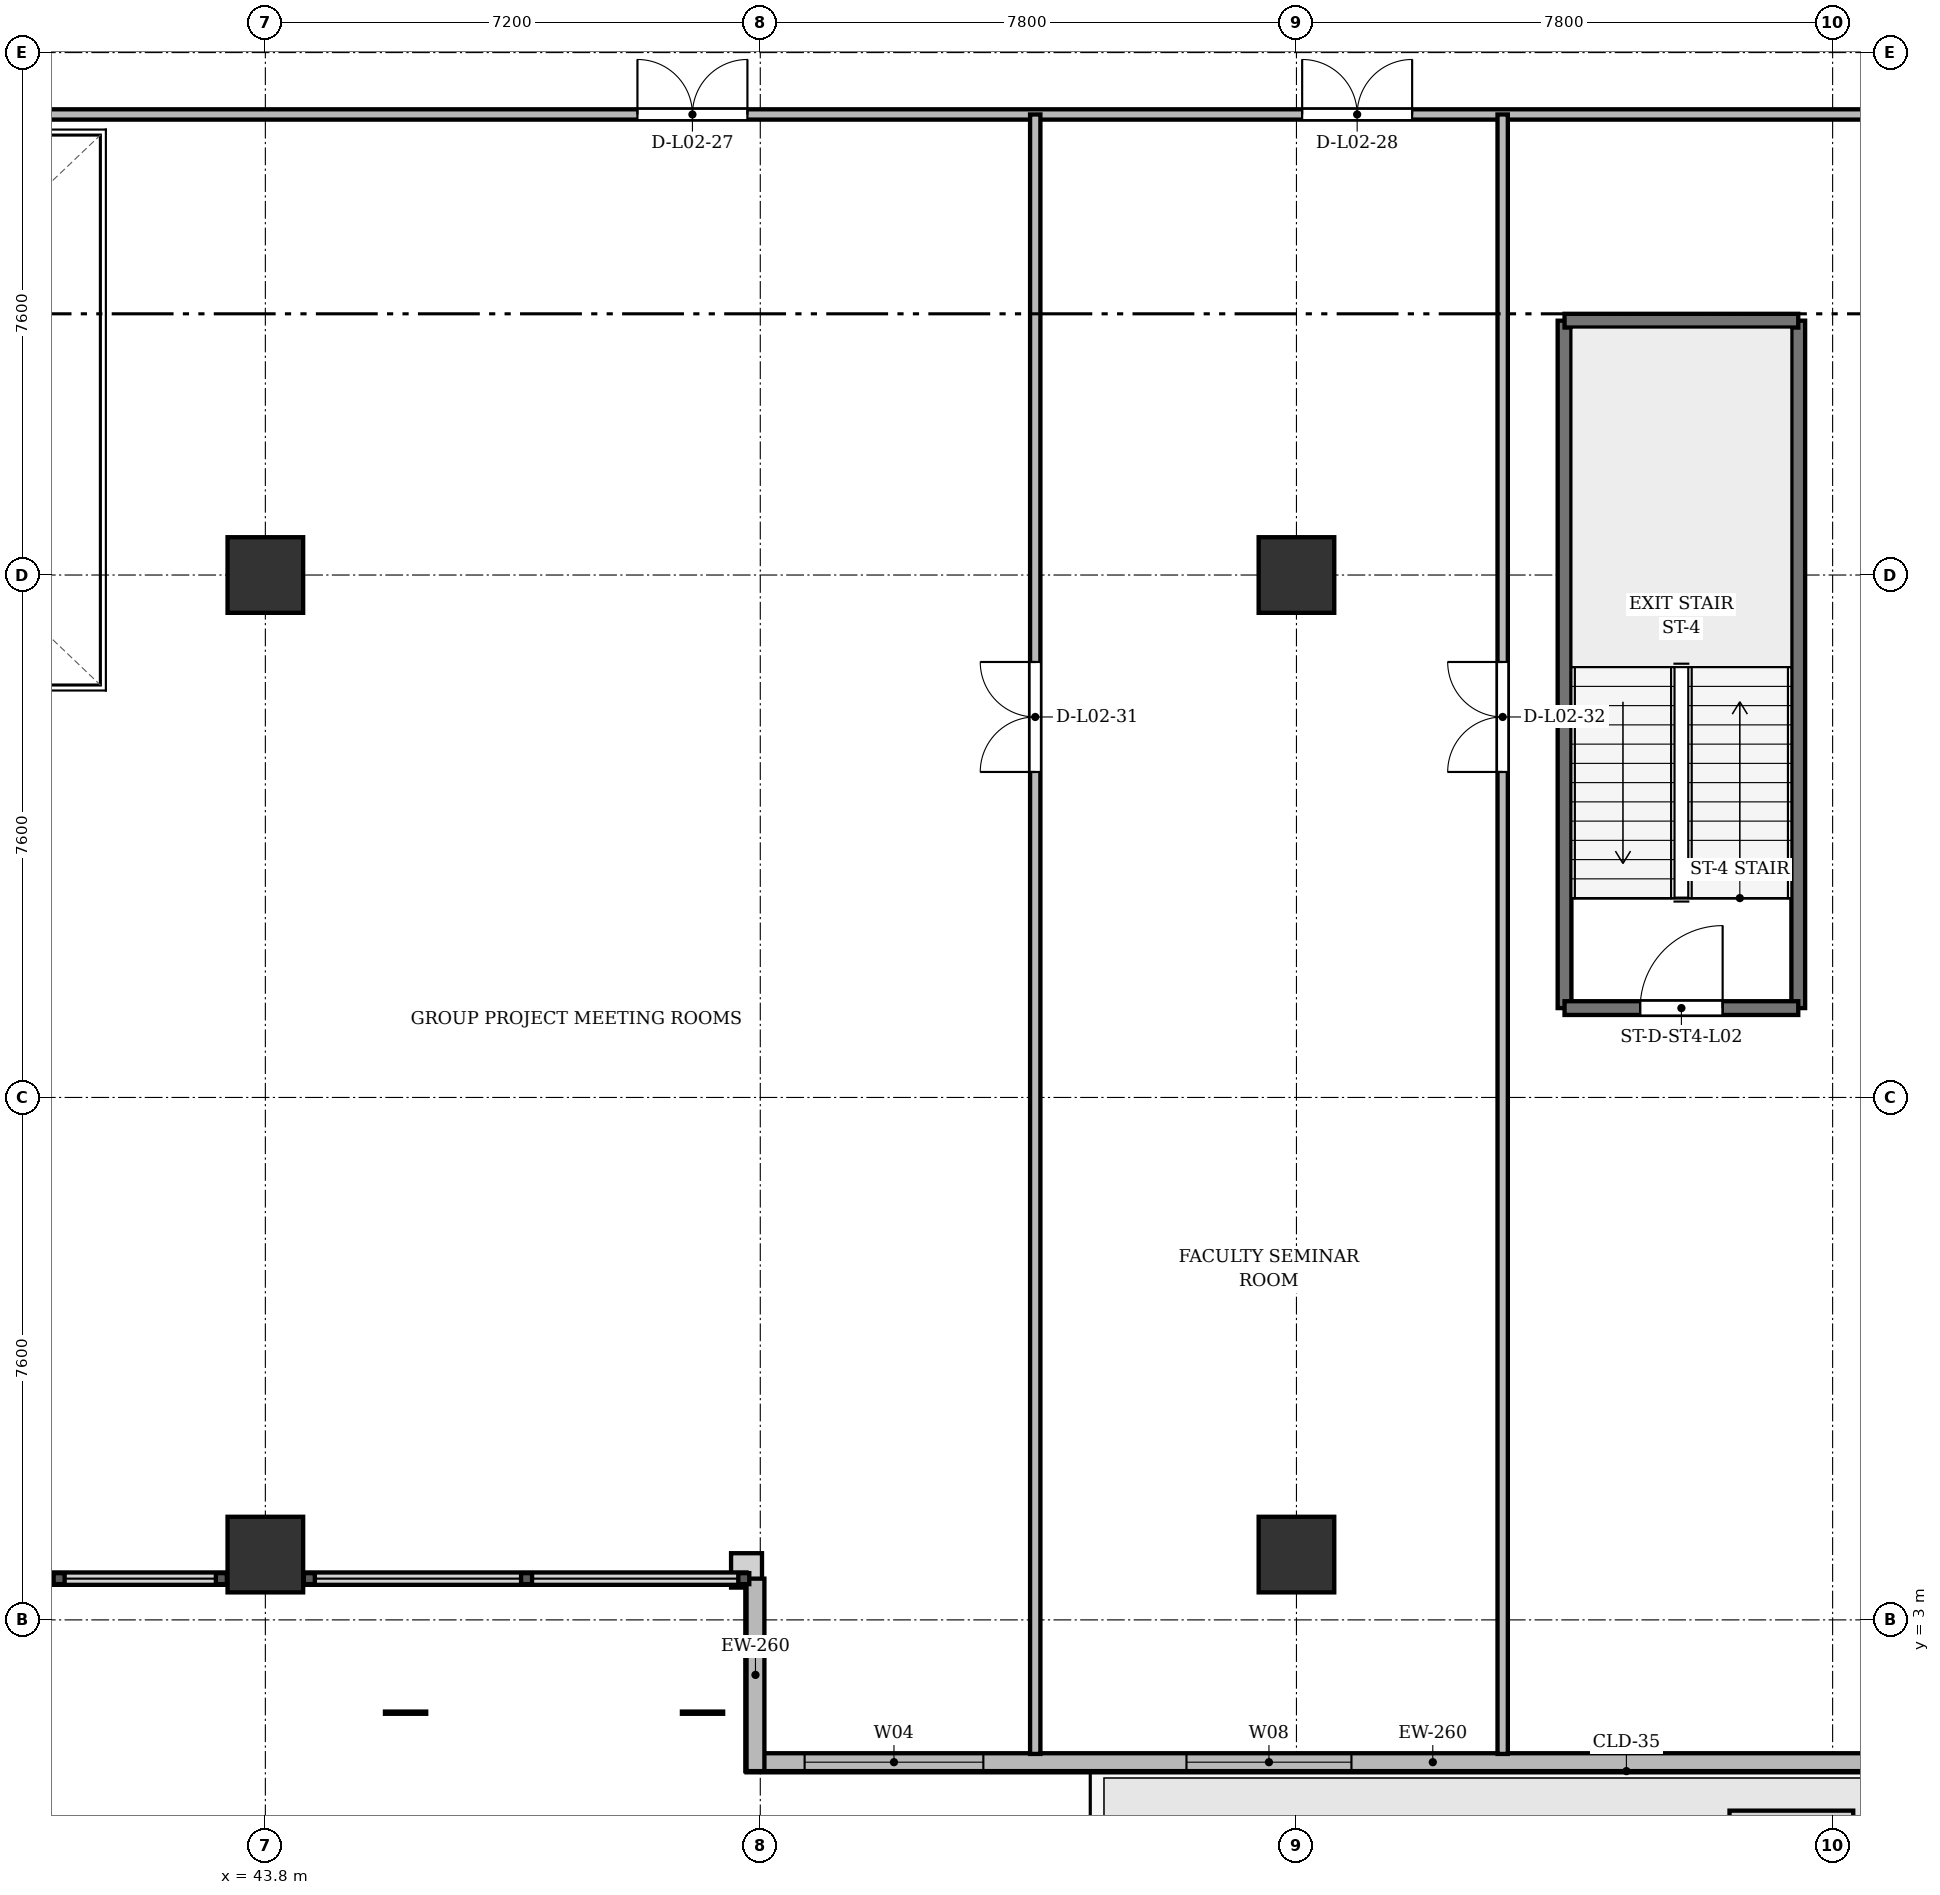
"""IFC4 building model, lengths in metres.
Left out: names, types, materials, properties, quantities, classifications, styles, units other than length and angle.
Written with IfcOpenShell. Run it as: python <this file> out.ifc"""

import sys

from ifc_helpers import new_model, si_unit, direction, frame, frame_2d, origin, origin_2d, place, context, subcontext, project, spatial, rectangle, extrude, source, transform, mapped, element, fill, save


model = new_model("IFC4")
c1 = context("Model", 3, precision=1e-05, world=origin(), true_north=direction((0.0, 1.0)))
c2 = subcontext(c1, "Body", "Model", "MODEL_VIEW")
j1 = project(units=[si_unit("LENGTHUNIT", "METRE"), si_unit("PLANEANGLEUNIT", "RADIAN")], contexts=[c1])
p1 = place(None, origin())
s1 = spatial("IfcSite", under=j1, at=p1, CompositionType="ELEMENT")
p2 = place(p1, origin())
s2 = spatial("IfcBuilding", under=s1, at=p2, CompositionType="ELEMENT")
p3 = place(p2, frame((0.0, 0.0, 9.7)))
s3 = spatial("IfcBuildingStorey", under=s2, at=p3, CompositionType="ELEMENT", Elevation=9.7)
m1 = source(origin(), c2, "Body", "SweptSolid", [
    extrude(rectangle(XDim=1.1, YDim=1.1, at=origin_2d()), origin(), (0.0, 0.0, 1.0), 4.5),
])
for number, where, z_axis, x_axis in (
    (1, (43.8, 3.95, 0.0), (0.0, 0.0, 1.0), (1.0, 0.0, 0.0)),
    (2, (43.8, 18.2, 0.0), (0.0, 0.0, 1.0), (1.0, 0.0, 0.0)),
    (3, (58.8, 3.95, 0.0), (0.0, 0.0, 1.0), (1.0, 0.0, 0.0)),
    (4, (58.8, 18.2, 0.0), (0.0, 0.0, 1.0), (1.0, 0.0, 0.0)),
):
    element("IfcColumn", number, at=place(p3, frame(where, z_axis=z_axis, x_axis=x_axis)), inside=s3, PredefinedType="COLUMN", context=c2, shape_type="MappedRepresentation", body=[
        mapped(m1, transform((0.0, 0.0, 0.0), x_axis=(1.0, 0.0, 0.0), y_axis=(0.0, 1.0, 0.0), z_axis=(0.0, 0.0, 1.0), scale=1.0)),
    ])
p4 = place(p3, frame((76.4, 0.93, 0.0), z_axis=(0.0, 0.0, 1.0), x_axis=(-1.0, 0.0, 0.0)))
e5 = element("IfcWall", 5, at=p4, inside=s3, PredefinedType="SOLIDWALL", context=c2, shape_type="SweptSolid", body=[
    extrude(rectangle(XDim=25.6, YDim=0.26, at=frame_2d((12.8, 0.0))), origin(), (0.0, 0.0, 1.0), 4.2),
])
p5 = place(p4, frame((3.833, 0.0, 0.0)))
e6 = element("IfcOpeningElement", 6, at=p5, cuts=e5, PredefinedType="OPENING", context=c2, shape_type="SweptSolid", body=[
    extrude(rectangle(XDim=1.5, YDim=2.25, at=frame_2d((0.75, 1.125))), frame((0.0, 0.14, 0.0), z_axis=(0.0, -1.0, 0.0), x_axis=(1.0, 0.0, 0.0)), (0.0, 0.0, 1.0), 0.28),
])
p6 = place(p4, frame((16.8, 0.0, 0.9)))
e7 = element("IfcOpeningElement", 7, at=p6, cuts=e5, PredefinedType="OPENING", context=c2, shape_type="SweptSolid", body=[
    extrude(rectangle(XDim=2.4, YDim=2.1, at=frame_2d((1.2, 1.05))), frame((0.0, 0.14, 0.0), z_axis=(0.0, -1.0, 0.0), x_axis=(1.0, 0.0, 0.0)), (0.0, 0.0, 1.0), 0.28),
])
p7 = place(p4, frame((22.155, 0.0, 0.9)))
e8 = element("IfcOpeningElement", 8, at=p7, cuts=e5, PredefinedType="OPENING", context=c2, shape_type="SweptSolid", body=[
    extrude(rectangle(XDim=2.6, YDim=1.9, at=frame_2d((1.3, 0.95))), frame((0.0, 0.14, 0.0), z_axis=(0.0, -1.0, 0.0), x_axis=(1.0, 0.0, 0.0)), (0.0, 0.0, 1.0), 0.28),
])
p8 = place(p3, frame((50.93, 0.8, 0.0), z_axis=(0.0, 0.0, 1.0), x_axis=(0.0, 1.0, 0.0)))
e9 = element("IfcWall", 9, at=p8, inside=s3, PredefinedType="SOLIDWALL", context=c2, shape_type="SweptSolid", body=[
    extrude(rectangle(XDim=2.8, YDim=0.26, at=frame_2d((1.4, 0.0))), origin(), (0.0, 0.0, 1.0), 4.2),
])
for number, where, z_axis, x_axis in (
    (10, (62.7, 11.9, 0.0), (0.0, 0.0, 1.0), (0.0, 1.0, 0.0)),
    (11, (66.1, 11.9, 0.0), (0.0, 0.0, 1.0), (0.0, 1.0, 0.0)),
):
    element("IfcWall", number, at=place(p3, frame(where, z_axis=z_axis, x_axis=x_axis)), inside=s3, PredefinedType="SHEAR", context=c2, shape_type="SweptSolid", body=[
        extrude(rectangle(XDim=10.0, YDim=0.2, at=frame_2d((5.0, 0.0))), origin(), (0.0, 0.0, 1.0), 4.2),
    ])
p9 = place(p3, frame((62.7, 11.9, 0.0), z_axis=(0.0, 0.0, 1.0), x_axis=(1.0, 0.0, 0.0)))
e12 = element("IfcWall", 12, at=p9, inside=s3, PredefinedType="SHEAR", context=c2, shape_type="SweptSolid", body=[
    extrude(rectangle(XDim=3.4, YDim=0.2, at=frame_2d((1.7, 0.0))), origin(), (0.0, 0.0, 1.0), 4.2),
])
p10 = place(p9, frame((1.1, 0.0, 0.0)))
e13 = element("IfcOpeningElement", 13, at=p10, cuts=e12, PredefinedType="OPENING", context=c2, shape_type="SweptSolid", body=[
    extrude(rectangle(XDim=1.2, YDim=2.15, at=frame_2d((0.6, 1.075))), frame((0.0, 0.11, 0.0), z_axis=(0.0, -1.0, 0.0), x_axis=(1.0, 0.0, 0.0)), (0.0, 0.0, 1.0), 0.22),
])
p11 = place(p3, frame((62.7, 21.9, 0.0), z_axis=(0.0, 0.0, 1.0), x_axis=(1.0, 0.0, 0.0)))
e14 = element("IfcWall", 14, at=p11, inside=s3, PredefinedType="SHEAR", context=c2, shape_type="SweptSolid", body=[
    extrude(rectangle(XDim=3.4, YDim=0.2, at=frame_2d((1.7, 0.0))), origin(), (0.0, 0.0, 1.0), 4.2),
])
p12 = place(p3, frame((-1.75, 24.9, 0.0), z_axis=(0.0, 0.0, 1.0), x_axis=(1.0, 0.0, 0.0)))
e15 = element("IfcWall", 15, at=p12, inside=s3, PredefinedType="PARTITIONING", context=c2, shape_type="SweptSolid", body=[
    extrude(rectangle(XDim=77.9, YDim=0.15, at=frame_2d((38.95, 0.0))), origin(), (0.0, 0.0, 1.0), 3.4),
])
p13 = place(p12, frame((2.679, 0.0, 0.0)))
e16 = element("IfcOpeningElement", 16, at=p13, cuts=e15, PredefinedType="OPENING", context=c2, shape_type="SweptSolid", body=[
    extrude(rectangle(XDim=1.6, YDim=2.2, at=frame_2d((0.8, 1.1))), frame((0.0, 0.085, 0.0), z_axis=(0.0, -1.0, 0.0), x_axis=(1.0, 0.0, 0.0)), (0.0, 0.0, 1.0), 0.17),
])
p14 = place(p12, frame((24.526, 0.0, 0.0)))
e17 = element("IfcOpeningElement", 17, at=p14, cuts=e15, PredefinedType="OPENING", context=c2, shape_type="SweptSolid", body=[
    extrude(rectangle(XDim=1.6, YDim=2.2, at=frame_2d((0.8, 1.1))), frame((0.0, 0.085, 0.0), z_axis=(0.0, -1.0, 0.0), x_axis=(1.0, 0.0, 0.0)), (0.0, 0.0, 1.0), 0.17),
])
p15 = place(p12, frame((50.963, 0.0, 0.0)))
e18 = element("IfcOpeningElement", 18, at=p15, cuts=e15, PredefinedType="OPENING", context=c2, shape_type="SweptSolid", body=[
    extrude(rectangle(XDim=1.6, YDim=2.2, at=frame_2d((0.8, 1.1))), frame((0.0, 0.085, 0.0), z_axis=(0.0, -1.0, 0.0), x_axis=(1.0, 0.0, 0.0)), (0.0, 0.0, 1.0), 0.17),
])
p16 = place(p12, frame((60.633, 0.0, 0.0)))
e19 = element("IfcOpeningElement", 19, at=p16, cuts=e15, PredefinedType="OPENING", context=c2, shape_type="SweptSolid", body=[
    extrude(rectangle(XDim=1.6, YDim=2.2, at=frame_2d((0.8, 1.1))), frame((0.0, 0.085, 0.0), z_axis=(0.0, -1.0, 0.0), x_axis=(1.0, 0.0, 0.0)), (0.0, 0.0, 1.0), 0.17),
])
p17 = place(p12, frame((74.888, 0.0, 0.0)))
e20 = element("IfcOpeningElement", 20, at=p17, cuts=e15, PredefinedType="OPENING", context=c2, shape_type="SweptSolid", body=[
    extrude(rectangle(XDim=1.6, YDim=2.2, at=frame_2d((0.8, 1.1))), frame((0.0, 0.085, 0.0), z_axis=(0.0, -1.0, 0.0), x_axis=(1.0, 0.0, 0.0)), (0.0, 0.0, 1.0), 0.17),
])
p18 = place(p3, frame((55.0, 1.05, 0.0), z_axis=(0.0, 0.0, 1.0), x_axis=(0.0, 1.0, 0.0)))
e21 = element("IfcWall", 21, at=p18, inside=s3, PredefinedType="PARTITIONING", context=c2, shape_type="SweptSolid", body=[
    extrude(rectangle(XDim=23.85, YDim=0.15, at=frame_2d((11.925, 0.0))), origin(), (0.0, 0.0, 1.0), 3.1),
])
p19 = place(p18, frame((14.285, 0.0, 0.0)))
e22 = element("IfcOpeningElement", 22, at=p19, cuts=e21, PredefinedType="OPENING", context=c2, shape_type="SweptSolid", body=[
    extrude(rectangle(XDim=1.6, YDim=2.2, at=frame_2d((0.8, 1.1))), frame((0.0, 0.085, 0.0), z_axis=(0.0, -1.0, 0.0), x_axis=(1.0, 0.0, 0.0)), (0.0, 0.0, 1.0), 0.17),
])
p20 = place(p3, frame((61.8, 1.05, 0.0), z_axis=(0.0, 0.0, 1.0), x_axis=(0.0, 1.0, 0.0)))
e23 = element("IfcWall", 23, at=p20, inside=s3, PredefinedType="PARTITIONING", context=c2, shape_type="SweptSolid", body=[
    extrude(rectangle(XDim=23.85, YDim=0.15, at=frame_2d((11.925, 0.0))), origin(), (0.0, 0.0, 1.0), 3.1),
])
p21 = place(p20, frame((14.285, 0.0, 0.0)))
e24 = element("IfcOpeningElement", 24, at=p21, cuts=e23, PredefinedType="OPENING", context=c2, shape_type="SweptSolid", body=[
    extrude(rectangle(XDim=1.6, YDim=2.2, at=frame_2d((0.8, 1.1))), frame((0.0, 0.085, 0.0), z_axis=(0.0, -1.0, 0.0), x_axis=(1.0, 0.0, 0.0)), (0.0, 0.0, 1.0), 0.17),
])
m2 = source(origin(), c2, "Body", "SweptSolid", [
    extrude(rectangle(XDim=2.4, YDim=2.1, at=frame_2d((1.2, 1.05))), frame((0.0, 0.03, 0.0), z_axis=(0.0, -1.0, 0.0), x_axis=(1.0, 0.0, 0.0)), (0.0, 0.0, 1.0), 0.06),
])
p22 = place(p6, origin())
e25 = element("IfcWindow", 25, at=p22, inside=s3, PartitioningType="SINGLE_PANEL", PredefinedType="WINDOW", context=c2, shape_type="MappedRepresentation", body=[
    mapped(m2, transform((0.0, 0.0, 0.0), x_axis=(1.0, 0.0, 0.0), y_axis=(0.0, 1.0, 0.0), z_axis=(0.0, 0.0, 1.0), scale=1.0)),
])
fill(e7, e25)
m3 = source(origin(), c2, "Body", "SweptSolid", [
    extrude(rectangle(XDim=2.6, YDim=1.9, at=frame_2d((1.3, 0.95))), frame((0.0, 0.03, 0.0), z_axis=(0.0, -1.0, 0.0), x_axis=(1.0, 0.0, 0.0)), (0.0, 0.0, 1.0), 0.06),
])
p23 = place(p7, origin())
e26 = element("IfcWindow", 26, at=p23, inside=s3, PartitioningType="SINGLE_PANEL", PredefinedType="WINDOW", context=c2, shape_type="MappedRepresentation", body=[
    mapped(m3, transform((0.0, 0.0, 0.0), x_axis=(1.0, 0.0, 0.0), y_axis=(0.0, 1.0, 0.0), z_axis=(0.0, 0.0, 1.0), scale=1.0)),
])
fill(e8, e26)
m4 = source(origin(), c2, "Body", "SweptSolid", [
    extrude(rectangle(XDim=1.2, YDim=2.15, at=frame_2d((0.6, 1.075))), frame((0.0, 0.025, 0.0), z_axis=(0.0, -1.0, 0.0), x_axis=(1.0, 0.0, 0.0)), (0.0, 0.0, 1.0), 0.05),
])
p24 = place(p10, origin())
e27 = element("IfcDoor", 27, at=p24, inside=s3, OperationType="SINGLE_SWING_RIGHT", PredefinedType="DOOR", context=c2, shape_type="MappedRepresentation", body=[
    mapped(m4, transform((0.0, 0.0, 0.0), x_axis=(1.0, 0.0, 0.0), y_axis=(0.0, 1.0, 0.0), z_axis=(0.0, 0.0, 1.0), scale=1.0)),
])
fill(e13, e27)
m5 = source(origin(), c2, "Body", "SweptSolid", [
    extrude(rectangle(XDim=1.6, YDim=2.2, at=frame_2d((0.8, 1.1))), frame((0.0, 0.025, 0.0), z_axis=(0.0, -1.0, 0.0), x_axis=(1.0, 0.0, 0.0)), (0.0, 0.0, 1.0), 0.05),
])
p25 = place(p15, origin())
e28 = element("IfcDoor", 28, at=p25, inside=s3, OperationType="DOUBLE_DOOR_SINGLE_SWING", PredefinedType="DOOR", context=c2, shape_type="MappedRepresentation", body=[
    mapped(m5, transform((0.0, 0.0, 0.0), x_axis=(1.0, 0.0, 0.0), y_axis=(0.0, 1.0, 0.0), z_axis=(0.0, 0.0, 1.0), scale=1.0)),
])
fill(e18, e28)
p26 = place(p16, origin())
e29 = element("IfcDoor", 29, at=p26, inside=s3, OperationType="DOUBLE_DOOR_SINGLE_SWING", PredefinedType="DOOR", context=c2, shape_type="MappedRepresentation", body=[
    mapped(m5, transform((0.0, 0.0, 0.0), x_axis=(1.0, 0.0, 0.0), y_axis=(0.0, 1.0, 0.0), z_axis=(0.0, 0.0, 1.0), scale=1.0)),
])
fill(e19, e29)
p27 = place(p19, origin())
e30 = element("IfcDoor", 30, at=p27, inside=s3, OperationType="DOUBLE_DOOR_SINGLE_SWING", PredefinedType="DOOR", context=c2, shape_type="MappedRepresentation", body=[
    mapped(m5, transform((0.0, 0.0, 0.0), x_axis=(1.0, 0.0, 0.0), y_axis=(0.0, 1.0, 0.0), z_axis=(0.0, 0.0, 1.0), scale=1.0)),
])
fill(e22, e30)
p28 = place(p21, origin())
e31 = element("IfcDoor", 31, at=p28, inside=s3, OperationType="DOUBLE_DOOR_SINGLE_SWING", PredefinedType="DOOR", context=c2, shape_type="MappedRepresentation", body=[
    mapped(m5, transform((0.0, 0.0, 0.0), x_axis=(1.0, 0.0, 0.0), y_axis=(0.0, 1.0, 0.0), z_axis=(0.0, 0.0, 1.0), scale=1.0)),
])
fill(e24, e31)
save(model, sys.argv[1])
